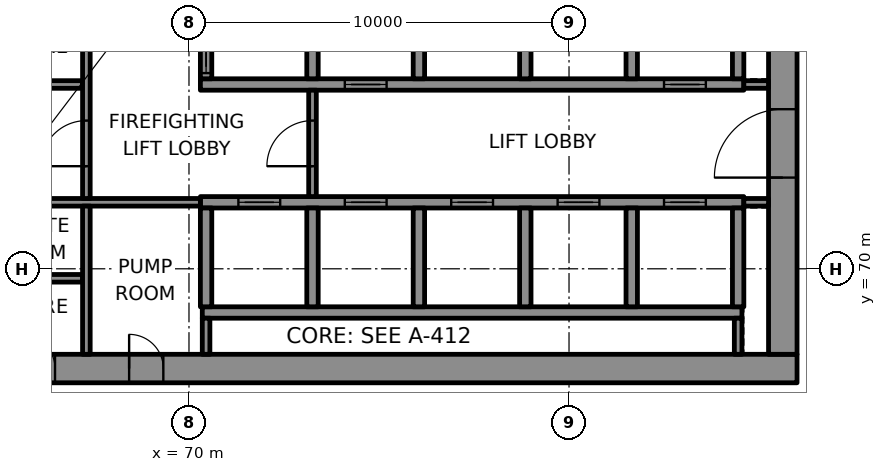
"""IFC4 building model, lengths in metres.
Left out: names, types, materials, properties, quantities, classifications, styles, units other than length and angle.
Written with IfcOpenShell. Run it as: python <this file> out.ifc"""

import sys

from ifc_helpers import new_model, si_unit, direction, frame, frame_2d, origin, place, context, subcontext, project, spatial, rectangle, extrude, element, fill, save


model = new_model("IFC4")
c1 = context("Model", 3, precision=1e-05, world=origin(), true_north=direction((0.0, 1.0)))
c2 = subcontext(c1, "Body", "Model", "MODEL_VIEW")
j1 = project(units=[si_unit("LENGTHUNIT", "METRE"), si_unit("PLANEANGLEUNIT", "RADIAN")], contexts=[c1])
p1 = place(None, origin())
s1 = spatial("IfcSite", under=j1, at=p1, CompositionType="ELEMENT")
p2 = place(p1, origin())
s2 = spatial("IfcBuilding", under=s1, at=p2, CompositionType="ELEMENT")
p3 = place(p2, frame((0.0, 0.0, 187.0)))
s3 = spatial("IfcBuildingStorey", under=s2, at=p3, CompositionType="ELEMENT", Elevation=187.0)
p4 = place(p3, frame((64.0, 67.375, 0.0), z_axis=(0.0, 0.0, 1.0), x_axis=(1.0, 0.0, 0.0)))
e1 = element("IfcWall", 1, at=p4, inside=s3, PredefinedType="SHEAR", context=c2, shape_type="SweptSolid", body=[
    extrude(rectangle(XDim=22.0, YDim=0.75, at=frame_2d((11.0, 0.0))), origin(), (0.0, 0.0, 1.0), 3.7),
])
p5 = place(p4, frame((1.575, 0.0, 0.0)))
e2 = element("IfcOpeningElement", 2, at=p5, cuts=e1, PredefinedType="OPENING", context=c2, shape_type="SweptSolid", body=[
    extrude(rectangle(XDim=0.9, YDim=2.1, at=frame_2d((0.45, 1.05))), frame((0.0, 0.385, 0.0), z_axis=(0.0, -1.0, 0.0), x_axis=(1.0, 0.0, 0.0)), (0.0, 0.0, 1.0), 0.77),
])
p6 = place(p4, frame((4.425, 0.0, 0.0)))
e3 = element("IfcOpeningElement", 3, at=p6, cuts=e1, PredefinedType="OPENING", context=c2, shape_type="SweptSolid", body=[
    extrude(rectangle(XDim=0.9, YDim=2.1, at=frame_2d((0.45, 1.05))), frame((0.0, 0.385, 0.0), z_axis=(0.0, -1.0, 0.0), x_axis=(1.0, 0.0, 0.0)), (0.0, 0.0, 1.0), 0.77),
])
p7 = place(p3, frame((85.625, 67.75, 0.0), z_axis=(0.0, 0.0, 1.0), x_axis=(0.0, 1.0, 0.0)))
e4 = element("IfcWall", 4, at=p7, inside=s3, PredefinedType="SHEAR", context=c2, shape_type="SweptSolid", body=[
    extrude(rectangle(XDim=14.5, YDim=0.75, at=frame_2d((7.25, 0.0))), origin(), (0.0, 0.0, 1.0), 3.7),
])
p8 = place(p7, frame((4.65, 0.0, 0.0)))
e5 = element("IfcOpeningElement", 5, at=p8, cuts=e4, PredefinedType="OPENING", context=c2, shape_type="SweptSolid", body=[
    extrude(rectangle(XDim=1.8, YDim=2.1, at=frame_2d((0.9, 1.05))), frame((0.0, 0.385, 0.0), z_axis=(0.0, -1.0, 0.0), x_axis=(1.0, 0.0, 0.0)), (0.0, 0.0, 1.0), 0.77),
])
p9 = place(p7, frame((11.8, 0.0, 0.0)))
e6 = element("IfcOpeningElement", 6, at=p9, cuts=e4, PredefinedType="OPENING", context=c2, shape_type="SweptSolid", body=[
    extrude(rectangle(XDim=0.9, YDim=2.1, at=frame_2d((0.45, 1.05))), frame((0.0, 0.385, 0.0), z_axis=(0.0, -1.0, 0.0), x_axis=(1.0, 0.0, 0.0)), (0.0, 0.0, 1.0), 0.77),
])
p10 = place(p3, frame((70.35, 68.85, 0.0), z_axis=(0.0, 0.0, 1.0), x_axis=(1.0, 0.0, 0.0)))
e7 = element("IfcWall", 7, at=p10, inside=s3, PredefinedType="SHEAR", context=c2, shape_type="SweptSolid", body=[
    extrude(rectangle(XDim=14.2, YDim=0.3, at=frame_2d((7.1, 0.0))), origin(), (0.0, 0.0, 1.0), 3.7),
])
p11 = place(p3, frame((70.3, 71.75, 0.0), z_axis=(0.0, 0.0, 1.0), x_axis=(1.0, 0.0, 0.0)))
e8 = element("IfcWall", 8, at=p11, inside=s3, PredefinedType="SHEAR", context=c2, shape_type="SweptSolid", body=[
    extrude(rectangle(XDim=14.3, YDim=0.3, at=frame_2d((7.15, 0.0))), origin(), (0.0, 0.0, 1.0), 3.7),
])
p12 = place(p11, frame((1.0, 0.0, 0.0)))
e9 = element("IfcOpeningElement", 9, at=p12, cuts=e8, PredefinedType="OPENING", context=c2, shape_type="SweptSolid", body=[
    extrude(rectangle(XDim=1.1, YDim=2.1, at=frame_2d((0.55, 1.05))), frame((0.0, 0.16, 0.0), z_axis=(0.0, -1.0, 0.0), x_axis=(1.0, 0.0, 0.0)), (0.0, 0.0, 1.0), 0.32),
])
p13 = place(p11, frame((3.8, 0.0, 0.0)))
e10 = element("IfcOpeningElement", 10, at=p13, cuts=e8, PredefinedType="OPENING", context=c2, shape_type="SweptSolid", body=[
    extrude(rectangle(XDim=1.1, YDim=2.1, at=frame_2d((0.55, 1.05))), frame((0.0, 0.16, 0.0), z_axis=(0.0, -1.0, 0.0), x_axis=(1.0, 0.0, 0.0)), (0.0, 0.0, 1.0), 0.32),
])
p14 = place(p11, frame((6.6, 0.0, 0.0)))
e11 = element("IfcOpeningElement", 11, at=p14, cuts=e8, PredefinedType="OPENING", context=c2, shape_type="SweptSolid", body=[
    extrude(rectangle(XDim=1.1, YDim=2.1, at=frame_2d((0.55, 1.05))), frame((0.0, 0.16, 0.0), z_axis=(0.0, -1.0, 0.0), x_axis=(1.0, 0.0, 0.0)), (0.0, 0.0, 1.0), 0.32),
])
p15 = place(p11, frame((9.4, 0.0, 0.0)))
e12 = element("IfcOpeningElement", 12, at=p15, cuts=e8, PredefinedType="OPENING", context=c2, shape_type="SweptSolid", body=[
    extrude(rectangle(XDim=1.1, YDim=2.1, at=frame_2d((0.55, 1.05))), frame((0.0, 0.16, 0.0), z_axis=(0.0, -1.0, 0.0), x_axis=(1.0, 0.0, 0.0)), (0.0, 0.0, 1.0), 0.32),
])
p16 = place(p11, frame((12.2, 0.0, 0.0)))
e13 = element("IfcOpeningElement", 13, at=p16, cuts=e8, PredefinedType="OPENING", context=c2, shape_type="SweptSolid", body=[
    extrude(rectangle(XDim=1.1, YDim=2.1, at=frame_2d((0.55, 1.05))), frame((0.0, 0.16, 0.0), z_axis=(0.0, -1.0, 0.0), x_axis=(1.0, 0.0, 0.0)), (0.0, 0.0, 1.0), 0.32),
])
p17 = place(p3, frame((70.3, 74.85, 0.0), z_axis=(0.0, 0.0, 1.0), x_axis=(1.0, 0.0, 0.0)))
e14 = element("IfcWall", 14, at=p17, inside=s3, PredefinedType="SHEAR", context=c2, shape_type="SweptSolid", body=[
    extrude(rectangle(XDim=14.3, YDim=0.3, at=frame_2d((7.15, 0.0))), origin(), (0.0, 0.0, 1.0), 3.7),
])
p18 = place(p17, frame((3.8, 0.0, 0.0)))
e15 = element("IfcOpeningElement", 15, at=p18, cuts=e14, PredefinedType="OPENING", context=c2, shape_type="SweptSolid", body=[
    extrude(rectangle(XDim=1.1, YDim=2.1, at=frame_2d((0.55, 1.05))), frame((0.0, 0.16, 0.0), z_axis=(0.0, -1.0, 0.0), x_axis=(1.0, 0.0, 0.0)), (0.0, 0.0, 1.0), 0.32),
])
p19 = place(p17, frame((12.2, 0.0, 0.0)))
e16 = element("IfcOpeningElement", 16, at=p19, cuts=e14, PredefinedType="OPENING", context=c2, shape_type="SweptSolid", body=[
    extrude(rectangle(XDim=1.1, YDim=2.1, at=frame_2d((0.55, 1.05))), frame((0.0, 0.16, 0.0), z_axis=(0.0, -1.0, 0.0), x_axis=(1.0, 0.0, 0.0)), (0.0, 0.0, 1.0), 0.32),
])
p20 = place(p3, frame((70.45, 69.0, 0.0), z_axis=(0.0, 0.0, 1.0), x_axis=(0.0, 1.0, 0.0)))
e17 = element("IfcWall", 17, at=p20, inside=s3, PredefinedType="SHEAR", context=c2, shape_type="SweptSolid", body=[
    extrude(rectangle(XDim=2.6, YDim=0.3, at=frame_2d((1.3, 0.0))), origin(), (0.0, 0.0, 1.0), 3.7),
])
p21 = place(p3, frame((70.45, 75.0, 0.0), z_axis=(0.0, 0.0, 1.0), x_axis=(0.0, 1.0, 0.0)))
e18 = element("IfcWall", 18, at=p21, inside=s3, PredefinedType="SHEAR", context=c2, shape_type="SweptSolid", body=[
    extrude(rectangle(XDim=2.6, YDim=0.3, at=frame_2d((1.3, 0.0))), origin(), (0.0, 0.0, 1.0), 3.7),
])
p22 = place(p21, frame((0.15, 0.0, 0.0)))
e19 = element("IfcOpeningElement", 19, at=p22, cuts=e18, PredefinedType="OPENING", context=c2, shape_type="SweptSolid", body=[
    extrude(rectangle(XDim=1.1, YDim=2.1, at=frame_2d((0.55, 1.05))), frame((0.0, 0.16, 0.0), z_axis=(0.0, -1.0, 0.0), x_axis=(1.0, 0.0, 0.0)), (0.0, 0.0, 1.0), 0.32),
])
for number, where, z_axis, x_axis in (
    (20, (73.25, 69.0, 0.0), (0.0, 0.0, 1.0), (0.0, 1.0, 0.0)),
    (21, (73.25, 75.0, 0.0), (0.0, 0.0, 1.0), (0.0, 1.0, 0.0)),
    (22, (76.05, 69.0, 0.0), (0.0, 0.0, 1.0), (0.0, 1.0, 0.0)),
    (23, (76.05, 75.0, 0.0), (0.0, 0.0, 1.0), (0.0, 1.0, 0.0)),
    (24, (78.85, 69.0, 0.0), (0.0, 0.0, 1.0), (0.0, 1.0, 0.0)),
    (25, (78.85, 75.0, 0.0), (0.0, 0.0, 1.0), (0.0, 1.0, 0.0)),
    (26, (81.65, 69.0, 0.0), (0.0, 0.0, 1.0), (0.0, 1.0, 0.0)),
    (27, (81.65, 75.0, 0.0), (0.0, 0.0, 1.0), (0.0, 1.0, 0.0)),
    (28, (84.45, 69.0, 0.0), (0.0, 0.0, 1.0), (0.0, 1.0, 0.0)),
    (29, (84.45, 75.0, 0.0), (0.0, 0.0, 1.0), (0.0, 1.0, 0.0)),
):
    element("IfcWall", number, at=place(p3, frame(where, z_axis=z_axis, x_axis=x_axis)), inside=s3, PredefinedType="SHEAR", context=c2, shape_type="SweptSolid", body=[
        extrude(rectangle(XDim=2.6, YDim=0.3, at=frame_2d((1.3, 0.0))), origin(), (0.0, 0.0, 1.0), 3.7),
    ])
p23 = place(p3, frame((64.75, 69.75, 0.0), z_axis=(0.0, 0.0, 1.0), x_axis=(1.0, 0.0, 0.0)))
e30 = element("IfcWall", 30, at=p23, inside=s3, PredefinedType="PARTITIONING", context=c2, shape_type="SweptSolid", body=[
    extrude(rectangle(XDim=2.45, YDim=0.2, at=frame_2d((1.225, 0.0))), origin(), (0.0, 0.0, 1.0), 3.7),
])
p24 = place(p3, frame((64.75, 71.75, 0.0), z_axis=(0.0, 0.0, 1.0), x_axis=(1.0, 0.0, 0.0)))
e31 = element("IfcWall", 31, at=p24, inside=s3, PredefinedType="PARTITIONING", context=c2, shape_type="SweptSolid", body=[
    extrude(rectangle(XDim=5.55, YDim=0.2, at=frame_2d((2.775, 0.0))), origin(), (0.0, 0.0, 1.0), 3.7),
])
p25 = place(p3, frame((84.6, 71.75, 0.0), z_axis=(0.0, 0.0, 1.0), x_axis=(1.0, 0.0, 0.0)))
e32 = element("IfcWall", 32, at=p25, inside=s3, PredefinedType="PARTITIONING", context=c2, shape_type="SweptSolid", body=[
    extrude(rectangle(XDim=0.65, YDim=0.2, at=frame_2d((0.325, 0.0))), origin(), (0.0, 0.0, 1.0), 3.7),
])
p26 = place(p3, frame((64.75, 74.85, 0.0), z_axis=(0.0, 0.0, 1.0), x_axis=(1.0, 0.0, 0.0)))
e33 = element("IfcWall", 33, at=p26, inside=s3, PredefinedType="PARTITIONING", context=c2, shape_type="SweptSolid", body=[
    extrude(rectangle(XDim=2.45, YDim=0.2, at=frame_2d((1.225, 0.0))), origin(), (0.0, 0.0, 1.0), 3.7),
])
p27 = place(p3, frame((84.6, 74.85, 0.0), z_axis=(0.0, 0.0, 1.0), x_axis=(1.0, 0.0, 0.0)))
e34 = element("IfcWall", 34, at=p27, inside=s3, PredefinedType="PARTITIONING", context=c2, shape_type="SweptSolid", body=[
    extrude(rectangle(XDim=0.65, YDim=0.2, at=frame_2d((0.325, 0.0))), origin(), (0.0, 0.0, 1.0), 3.7),
])
p28 = place(p3, frame((67.3, 67.75, 0.0), z_axis=(0.0, 0.0, 1.0), x_axis=(0.0, 1.0, 0.0)))
e35 = element("IfcWall", 35, at=p28, inside=s3, PredefinedType="PARTITIONING", context=c2, shape_type="SweptSolid", body=[
    extrude(rectangle(XDim=3.9, YDim=0.2, at=frame_2d((1.95, 0.0))), origin(), (0.0, 0.0, 1.0), 3.7),
])
p29 = place(p3, frame((67.3, 71.85, 0.0), z_axis=(0.0, 0.0, 1.0), x_axis=(0.0, 1.0, 0.0)))
e36 = element("IfcWall", 36, at=p29, inside=s3, PredefinedType="PARTITIONING", context=c2, shape_type="SweptSolid", body=[
    extrude(rectangle(XDim=5.75, YDim=0.2, at=frame_2d((2.875, 0.0))), origin(), (0.0, 0.0, 1.0), 3.7),
])
p30 = place(p29, frame((0.85, 0.0, 0.0)))
e37 = element("IfcOpeningElement", 37, at=p30, cuts=e36, PredefinedType="OPENING", context=c2, shape_type="SweptSolid", body=[
    extrude(rectangle(XDim=1.2, YDim=2.1, at=frame_2d((0.6, 1.05))), frame((0.0, 0.11, 0.0), z_axis=(0.0, -1.0, 0.0), x_axis=(1.0, 0.0, 0.0)), (0.0, 0.0, 1.0), 0.22),
])
p31 = place(p3, frame((70.45, 67.75, 0.0), z_axis=(0.0, 0.0, 1.0), x_axis=(0.0, 1.0, 0.0)))
e38 = element("IfcWall", 38, at=p31, inside=s3, PredefinedType="PARTITIONING", context=c2, shape_type="SweptSolid", body=[
    extrude(rectangle(XDim=0.95, YDim=0.2, at=frame_2d((0.475, 0.0))), origin(), (0.0, 0.0, 1.0), 3.7),
])
p32 = place(p3, frame((73.25, 71.9, 0.0), z_axis=(0.0, 0.0, 1.0), x_axis=(0.0, 1.0, 0.0)))
e39 = element("IfcWall", 39, at=p32, inside=s3, PredefinedType="PARTITIONING", context=c2, shape_type="SweptSolid", body=[
    extrude(rectangle(XDim=2.8, YDim=0.2, at=frame_2d((1.4, 0.0))), origin(), (0.0, 0.0, 1.0), 3.7),
])
p33 = place(p32, frame((0.8, 0.0, 0.0)))
e40 = element("IfcOpeningElement", 40, at=p33, cuts=e39, PredefinedType="OPENING", context=c2, shape_type="SweptSolid", body=[
    extrude(rectangle(XDim=1.2, YDim=2.1, at=frame_2d((0.6, 1.05))), frame((0.0, 0.11, 0.0), z_axis=(0.0, -1.0, 0.0), x_axis=(1.0, 0.0, 0.0)), (0.0, 0.0, 1.0), 0.22),
])
p34 = place(p3, frame((84.45, 67.75, 0.0), z_axis=(0.0, 0.0, 1.0), x_axis=(0.0, 1.0, 0.0)))
e41 = element("IfcWall", 41, at=p34, inside=s3, PredefinedType="PARTITIONING", context=c2, shape_type="SweptSolid", body=[
    extrude(rectangle(XDim=0.95, YDim=0.2, at=frame_2d((0.475, 0.0))), origin(), (0.0, 0.0, 1.0), 3.7),
])
p35 = place(p12, origin())
e42 = element("IfcDoor", 42, at=p35, inside=s3, OperationType="DOUBLE_DOOR_SLIDING", PredefinedType="DOOR", context=c2, shape_type="SweptSolid", body=[
    extrude(rectangle(XDim=1.1, YDim=2.1, at=frame_2d((0.55, 1.05))), frame((0.0, 0.025, 0.0), z_axis=(0.0, -1.0, 0.0), x_axis=(1.0, 0.0, 0.0)), (0.0, 0.0, 1.0), 0.05),
])
fill(e9, e42)
p36 = place(p13, origin())
e43 = element("IfcDoor", 43, at=p36, inside=s3, OperationType="DOUBLE_DOOR_SLIDING", PredefinedType="DOOR", context=c2, shape_type="SweptSolid", body=[
    extrude(rectangle(XDim=1.1, YDim=2.1, at=frame_2d((0.55, 1.05))), frame((0.0, 0.025, 0.0), z_axis=(0.0, -1.0, 0.0), x_axis=(1.0, 0.0, 0.0)), (0.0, 0.0, 1.0), 0.05),
])
fill(e10, e43)
p37 = place(p14, origin())
e44 = element("IfcDoor", 44, at=p37, inside=s3, OperationType="DOUBLE_DOOR_SLIDING", PredefinedType="DOOR", context=c2, shape_type="SweptSolid", body=[
    extrude(rectangle(XDim=1.1, YDim=2.1, at=frame_2d((0.55, 1.05))), frame((0.0, 0.025, 0.0), z_axis=(0.0, -1.0, 0.0), x_axis=(1.0, 0.0, 0.0)), (0.0, 0.0, 1.0), 0.05),
])
fill(e11, e44)
p38 = place(p15, origin())
e45 = element("IfcDoor", 45, at=p38, inside=s3, OperationType="DOUBLE_DOOR_SLIDING", PredefinedType="DOOR", context=c2, shape_type="SweptSolid", body=[
    extrude(rectangle(XDim=1.1, YDim=2.1, at=frame_2d((0.55, 1.05))), frame((0.0, 0.025, 0.0), z_axis=(0.0, -1.0, 0.0), x_axis=(1.0, 0.0, 0.0)), (0.0, 0.0, 1.0), 0.05),
])
fill(e12, e45)
p39 = place(p16, origin())
e46 = element("IfcDoor", 46, at=p39, inside=s3, OperationType="DOUBLE_DOOR_SLIDING", PredefinedType="DOOR", context=c2, shape_type="SweptSolid", body=[
    extrude(rectangle(XDim=1.1, YDim=2.1, at=frame_2d((0.55, 1.05))), frame((0.0, 0.025, 0.0), z_axis=(0.0, -1.0, 0.0), x_axis=(1.0, 0.0, 0.0)), (0.0, 0.0, 1.0), 0.05),
])
fill(e13, e46)
p40 = place(p22, origin())
e47 = element("IfcDoor", 47, at=p40, inside=s3, OperationType="DOUBLE_DOOR_SLIDING", PredefinedType="DOOR", context=c2, shape_type="SweptSolid", body=[
    extrude(rectangle(XDim=1.1, YDim=2.1, at=frame_2d((0.55, 1.05))), frame((0.0, 0.025, 0.0), z_axis=(0.0, -1.0, 0.0), x_axis=(1.0, 0.0, 0.0)), (0.0, 0.0, 1.0), 0.05),
])
fill(e19, e47)
p41 = place(p18, origin())
e48 = element("IfcDoor", 48, at=p41, inside=s3, OperationType="DOUBLE_DOOR_SLIDING", PredefinedType="DOOR", context=c2, shape_type="SweptSolid", body=[
    extrude(rectangle(XDim=1.1, YDim=2.1, at=frame_2d((0.55, 1.05))), frame((0.0, 0.025, 0.0), z_axis=(0.0, -1.0, 0.0), x_axis=(1.0, 0.0, 0.0)), (0.0, 0.0, 1.0), 0.05),
])
fill(e15, e48)
p42 = place(p19, origin())
e49 = element("IfcDoor", 49, at=p42, inside=s3, OperationType="DOUBLE_DOOR_SLIDING", PredefinedType="DOOR", context=c2, shape_type="SweptSolid", body=[
    extrude(rectangle(XDim=1.1, YDim=2.1, at=frame_2d((0.55, 1.05))), frame((0.0, 0.025, 0.0), z_axis=(0.0, -1.0, 0.0), x_axis=(1.0, 0.0, 0.0)), (0.0, 0.0, 1.0), 0.05),
])
fill(e16, e49)
p43 = place(p33, origin())
e50 = element("IfcDoor", 50, at=p43, inside=s3, OperationType="SINGLE_SWING_LEFT", PredefinedType="DOOR", context=c2, shape_type="SweptSolid", body=[
    extrude(rectangle(XDim=1.2, YDim=2.1, at=frame_2d((0.6, 1.05))), frame((0.0, 0.025, 0.0), z_axis=(0.0, -1.0, 0.0), x_axis=(1.0, 0.0, 0.0)), (0.0, 0.0, 1.0), 0.05),
])
fill(e40, e50)
p44 = place(p30, origin())
e51 = element("IfcDoor", 51, at=p44, inside=s3, OperationType="SINGLE_SWING_RIGHT", PredefinedType="DOOR", context=c2, shape_type="SweptSolid", body=[
    extrude(rectangle(XDim=1.2, YDim=2.1, at=frame_2d((0.6, 1.05))), frame((0.0, 0.025, 0.0), z_axis=(0.0, -1.0, 0.0), x_axis=(1.0, 0.0, 0.0)), (0.0, 0.0, 1.0), 0.05),
])
fill(e37, e51)
p45 = place(p8, origin())
e52 = element("IfcDoor", 52, at=p45, inside=s3, OperationType="SINGLE_SWING_RIGHT", PredefinedType="DOOR", context=c2, shape_type="SweptSolid", body=[
    extrude(rectangle(XDim=1.8, YDim=2.1, at=frame_2d((0.9, 1.05))), frame((0.0, 0.095, 0.0), z_axis=(0.0, -1.0, 0.0), x_axis=(1.0, 0.0, 0.0)), (0.0, 0.0, 1.0), 0.19),
])
fill(e5, e52)
p46 = place(p5, origin())
e53 = element("IfcDoor", 53, at=p46, inside=s3, OperationType="SINGLE_SWING_LEFT", PredefinedType="DOOR", context=c2, shape_type="SweptSolid", body=[
    extrude(rectangle(XDim=0.9, YDim=2.1, at=frame_2d((0.45, 1.05))), frame((0.0, 0.095, 0.0), z_axis=(0.0, -1.0, 0.0), x_axis=(1.0, 0.0, 0.0)), (0.0, 0.0, 1.0), 0.19),
])
fill(e2, e53)
p47 = place(p6, origin())
e54 = element("IfcDoor", 54, at=p47, inside=s3, OperationType="SINGLE_SWING_LEFT", PredefinedType="DOOR", context=c2, shape_type="SweptSolid", body=[
    extrude(rectangle(XDim=0.9, YDim=2.1, at=frame_2d((0.45, 1.05))), frame((0.0, 0.095, 0.0), z_axis=(0.0, -1.0, 0.0), x_axis=(1.0, 0.0, 0.0)), (0.0, 0.0, 1.0), 0.19),
])
fill(e3, e54)
save(model, sys.argv[1])
